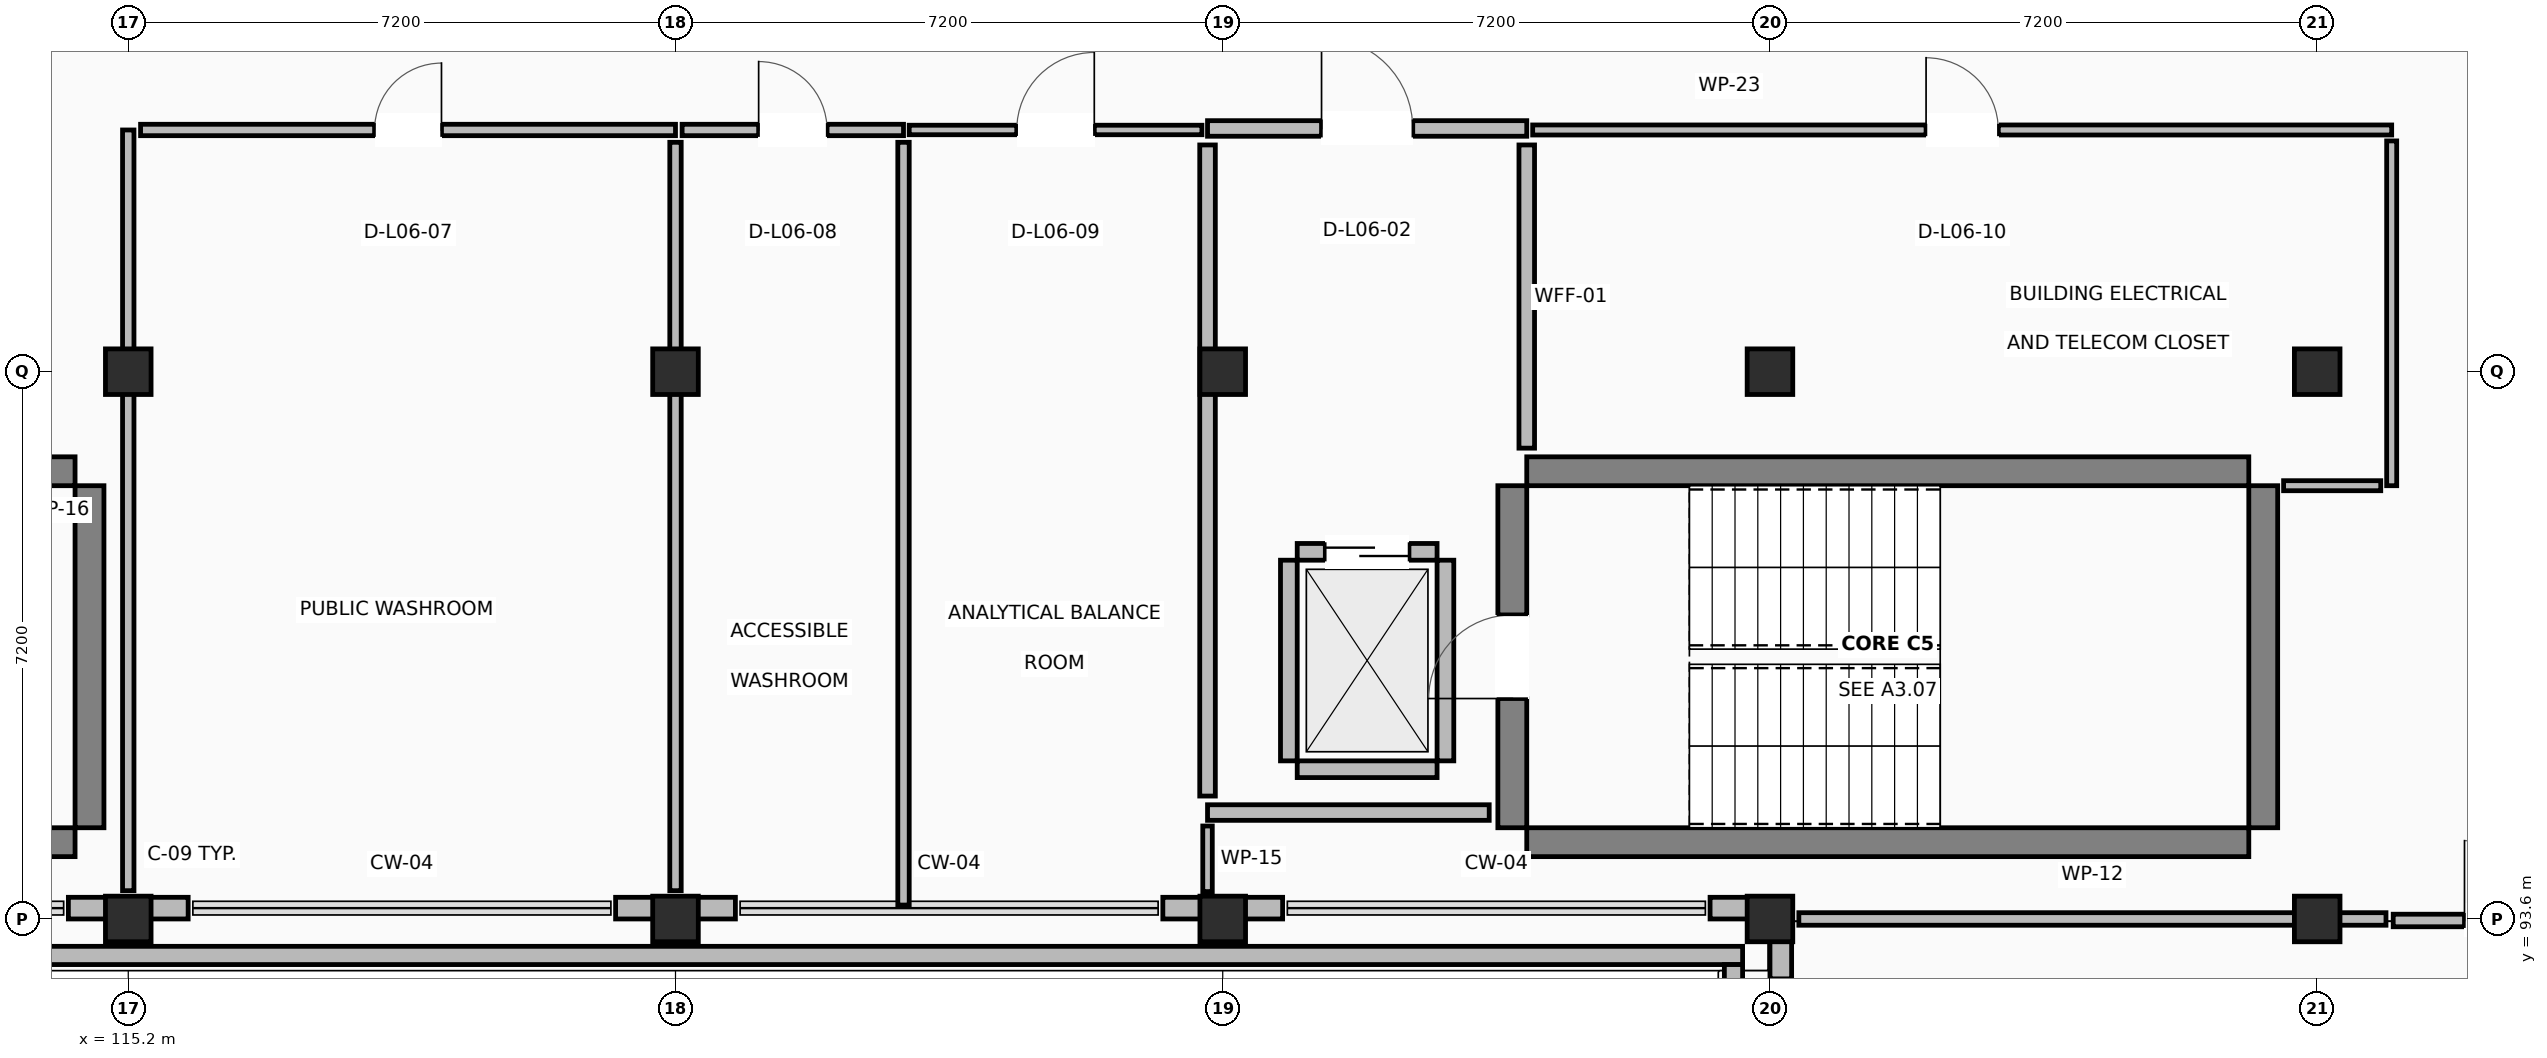
"""IFC4 building model, lengths in metres.
Left out: names, types, materials, properties, quantities, classifications, styles, units other than length and angle.
Written with IfcOpenShell. Run it as: python <this file> out.ifc"""

import sys

from ifc_helpers import new_model, si_unit, direction, frame, frame_2d, origin, origin_2d, place, context, subcontext, project, spatial, rectangle, extrude, element, fill, save


model = new_model("IFC4")
c1 = context("Model", 3, precision=1e-05, world=origin(), true_north=direction((0.0, 1.0)))
c2 = subcontext(c1, "Body", "Model", "MODEL_VIEW")
j1 = project(units=[si_unit("LENGTHUNIT", "METRE"), si_unit("PLANEANGLEUNIT", "RADIAN")], contexts=[c1])
p1 = place(None, origin())
s1 = spatial("IfcSite", under=j1, at=p1, CompositionType="ELEMENT")
p2 = place(p1, origin())
s2 = spatial("IfcBuilding", under=s1, at=p2, CompositionType="ELEMENT")
p3 = place(p2, frame((0.0, 0.0, 27.0)))
s3 = spatial("IfcBuildingStorey", under=s2, at=p3, CompositionType="ELEMENT", Elevation=27.0)
for number, where, z_axis, x_axis in (
    (1, (115.2, 93.6, 0.0), (0.0, 0.0, 1.0), (1.0, 0.0, 0.0)),
    (2, (115.2, 100.8, 0.0), (0.0, 0.0, 1.0), (1.0, 0.0, 0.0)),
    (3, (122.4, 93.6, 0.0), (0.0, 0.0, 1.0), (1.0, 0.0, 0.0)),
    (4, (122.4, 100.8, 0.0), (0.0, 0.0, 1.0), (1.0, 0.0, 0.0)),
    (5, (129.6, 93.6, 0.0), (0.0, 0.0, 1.0), (1.0, 0.0, 0.0)),
    (6, (129.6, 100.8, 0.0), (0.0, 0.0, 1.0), (1.0, 0.0, 0.0)),
    (7, (136.8, 93.6, 0.0), (0.0, 0.0, 1.0), (1.0, 0.0, 0.0)),
    (8, (136.8, 100.8, 0.0), (0.0, 0.0, 1.0), (1.0, 0.0, 0.0)),
    (9, (144.0, 93.6, 0.0), (0.0, 0.0, 1.0), (1.0, 0.0, 0.0)),
    (10, (144.0, 100.8, 0.0), (0.0, 0.0, 1.0), (1.0, 0.0, 0.0)),
):
    element("IfcColumn", number, at=place(p3, frame(where, z_axis=z_axis, x_axis=x_axis)), inside=s3, PredefinedType="COLUMN", context=c2, shape_type="SweptSolid", body=[
        extrude(rectangle(XDim=0.6, YDim=0.6, at=origin_2d()), origin(), (0.0, 0.0, 1.0), 3.92),
    ])
for number, where, z_axis, x_axis in (
    (11, (105.0, 94.61, 0.0), (0.0, 0.0, 1.0), (1.0, 0.0, 0.0)),
    (12, (105.0, 99.49, 0.0), (0.0, 0.0, 1.0), (1.0, 0.0, 0.0)),
):
    element("IfcWall", number, at=place(p3, frame(where, z_axis=z_axis, x_axis=x_axis)), inside=s3, PredefinedType="SHEAR", context=c2, shape_type="SweptSolid", body=[
        extrude(rectangle(XDim=9.5, YDim=0.38, at=frame_2d((4.75, 0.0))), origin(), (0.0, 0.0, 1.0), 3.92),
    ])
p4 = place(p3, frame((114.69, 94.8, 0.0), z_axis=(0.0, 0.0, 1.0), x_axis=(0.0, 1.0, 0.0)))
e13 = element("IfcWall", 13, at=p4, inside=s3, PredefinedType="SHEAR", context=c2, shape_type="SweptSolid", body=[
    extrude(rectangle(XDim=4.5, YDim=0.38, at=frame_2d((2.25, 0.0))), origin(), (0.0, 0.0, 1.0), 3.92),
])
for number, where, z_axis, x_axis in (
    (14, (133.6, 94.61, 0.0), (0.0, 0.0, 1.0), (1.0, 0.0, 0.0)),
    (15, (133.6, 99.49, 0.0), (0.0, 0.0, 1.0), (1.0, 0.0, 0.0)),
):
    element("IfcWall", number, at=place(p3, frame(where, z_axis=z_axis, x_axis=x_axis)), inside=s3, PredefinedType="SHEAR", context=c2, shape_type="SweptSolid", body=[
        extrude(rectangle(XDim=9.5, YDim=0.38, at=frame_2d((4.75, 0.0))), origin(), (0.0, 0.0, 1.0), 3.92),
    ])
p5 = place(p3, frame((133.41, 94.8, 0.0), z_axis=(0.0, 0.0, 1.0), x_axis=(0.0, 1.0, 0.0)))
e16 = element("IfcWall", 16, at=p5, inside=s3, PredefinedType="SHEAR", context=c2, shape_type="SweptSolid", body=[
    extrude(rectangle(XDim=4.5, YDim=0.38, at=frame_2d((2.25, 0.0))), origin(), (0.0, 0.0, 1.0), 3.92),
])
p6 = place(p5, frame((1.7, 0.0, 0.0)))
e17 = element("IfcOpeningElement", 17, at=p6, cuts=e16, PredefinedType="OPENING", context=c2, shape_type="SweptSolid", body=[
    extrude(rectangle(XDim=1.1, YDim=2.15, at=frame_2d((0.55, 1.075))), frame((0.0, 0.2, 0.0), z_axis=(0.0, -1.0, 0.0), x_axis=(1.0, 0.0, 0.0)), (0.0, 0.0, 1.0), 0.4),
])
p7 = place(p3, frame((143.29, 94.8, 0.0), z_axis=(0.0, 0.0, 1.0), x_axis=(0.0, 1.0, 0.0)))
e18 = element("IfcWall", 18, at=p7, inside=s3, PredefinedType="SHEAR", context=c2, shape_type="SweptSolid", body=[
    extrude(rectangle(XDim=4.5, YDim=0.38, at=frame_2d((2.25, 0.0))), origin(), (0.0, 0.0, 1.0), 3.92),
])
for number, where, z_axis, x_axis in (
    (19, (114.412, 93.742, 0.0), (0.0, 0.0, 1.0), (1.0, 0.0, 0.0)),
    (20, (121.612, 93.742, 0.0), (0.0, 0.0, 1.0), (1.0, 0.0, 0.0)),
    (21, (128.812, 93.742, 0.0), (0.0, 0.0, 1.0), (1.0, 0.0, 0.0)),
):
    element("IfcWall", number, at=place(p3, frame(where, z_axis=z_axis, x_axis=x_axis)), inside=s3, PredefinedType="STANDARD", context=c2, shape_type="SweptSolid", body=[
        extrude(rectangle(XDim=1.576, YDim=0.285, at=frame_2d((0.788, 0.0))), origin(), (0.0, 0.0, 1.0), 2.96),
    ])
p8 = place(p3, frame((136.012, 93.742, 0.0), z_axis=(0.0, 0.0, 1.0), x_axis=(1.0, 0.0, 0.0)))
e22 = element("IfcWall", 22, at=p8, inside=s3, PredefinedType="STANDARD", context=c2, shape_type="SweptSolid", body=[
    extrude(rectangle(XDim=0.788, YDim=0.285, at=frame_2d((0.394, 0.0))), origin(), (0.0, 0.0, 1.0), 2.96),
])
p9 = place(p3, frame((136.942, 93.885, 0.0), z_axis=(0.0, 0.0, 1.0), x_axis=(0.0, -1.0, 0.0)))
e23 = element("IfcWall", 23, at=p9, inside=s3, PredefinedType="STANDARD", context=c2, shape_type="SweptSolid", body=[
    extrude(rectangle(XDim=1.073, YDim=0.285, at=frame_2d((0.537, 0.0))), origin(), (0.0, 0.0, 1.0), 2.96),
])
p10 = place(p3, frame((136.44, 93.12, 0.0), z_axis=(0.0, 0.0, 1.0), x_axis=(-1.0, 0.0, 0.0)))
e24 = element("IfcWall", 24, at=p10, inside=s3, PredefinedType="PARAPET", context=c2, shape_type="SweptSolid", body=[
    extrude(rectangle(XDim=57.84, YDim=0.24, at=frame_2d((28.92, 0.0))), origin(), (0.0, 0.0, 1.0), 1.12),
])
p11 = place(p3, frame((136.32, 86.04, 0.0), z_axis=(0.0, 0.0, 1.0), x_axis=(0.0, 1.0, 0.0)))
e25 = element("IfcWall", 25, at=p11, inside=s3, PredefinedType="PARAPET", context=c2, shape_type="SweptSolid", body=[
    extrude(rectangle(XDim=6.96, YDim=0.24, at=frame_2d((3.48, 0.0))), origin(), (0.0, 0.0, 1.0), 1.12),
])
p12 = place(p3, frame((130.58, 95.57, 0.0), z_axis=(0.0, 0.0, 1.0), x_axis=(1.0, 0.0, 0.0)))
e26 = element("IfcWall", 26, at=p12, inside=s3, PredefinedType="STANDARD", context=c2, shape_type="SweptSolid", body=[
    extrude(rectangle(XDim=1.84, YDim=0.22, at=frame_2d((0.92, 0.0))), origin(), (0.0, 0.0, 1.0), 2.96),
])
p13 = place(p3, frame((130.58, 98.43, 0.0), z_axis=(0.0, 0.0, 1.0), x_axis=(1.0, 0.0, 0.0)))
e27 = element("IfcWall", 27, at=p13, inside=s3, PredefinedType="STANDARD", context=c2, shape_type="SweptSolid", body=[
    extrude(rectangle(XDim=1.84, YDim=0.22, at=frame_2d((0.92, 0.0))), origin(), (0.0, 0.0, 1.0), 2.96),
])
p14 = place(p13, frame((0.37, 0.0, 0.0)))
e28 = element("IfcOpeningElement", 28, at=p14, cuts=e27, PredefinedType="OPENING", context=c2, shape_type="SweptSolid", body=[
    extrude(rectangle(XDim=1.1, YDim=2.15, at=frame_2d((0.55, 1.075))), frame((0.0, 0.12, 0.0), z_axis=(0.0, -1.0, 0.0), x_axis=(1.0, 0.0, 0.0)), (0.0, 0.0, 1.0), 0.24),
])
for number, where, z_axis, x_axis in (
    (29, (130.47, 95.68, 0.0), (0.0, 0.0, 1.0), (0.0, 1.0, 0.0)),
    (30, (132.53, 95.68, 0.0), (0.0, 0.0, 1.0), (0.0, 1.0, 0.0)),
):
    element("IfcWall", number, at=place(p3, frame(where, z_axis=z_axis, x_axis=x_axis)), inside=s3, PredefinedType="STANDARD", context=c2, shape_type="SweptSolid", body=[
        extrude(rectangle(XDim=2.64, YDim=0.22, at=frame_2d((1.32, 0.0))), origin(), (0.0, 0.0, 1.0), 2.96),
    ])
p15 = place(p3, frame((129.4, 104.0, 0.0), z_axis=(0.0, 0.0, 1.0), x_axis=(1.0, 0.0, 0.0)))
e31 = element("IfcWall", 31, at=p15, inside=s3, PredefinedType="PARTITIONING", context=c2, shape_type="SweptSolid", body=[
    extrude(rectangle(XDim=4.2, YDim=0.205, at=frame_2d((2.1, 0.0))), origin(), (0.0, 0.0, 1.0), 2.96),
])
p16 = place(p15, frame((1.5, 0.0, 0.0)))
e32 = element("IfcOpeningElement", 32, at=p16, cuts=e31, PredefinedType="OPENING", context=c2, shape_type="SweptSolid", body=[
    extrude(rectangle(XDim=1.2, YDim=2.15, at=frame_2d((0.6, 1.075))), frame((0.0, 0.113, 0.0), z_axis=(0.0, -1.0, 0.0), x_axis=(1.0, 0.0, 0.0)), (0.0, 0.0, 1.0), 0.225),
])
p17 = place(p3, frame((133.6, 103.783, 0.0), z_axis=(0.0, 0.0, 1.0), x_axis=(0.0, -1.0, 0.0)))
e33 = element("IfcWall", 33, at=p17, inside=s3, PredefinedType="PARTITIONING", context=c2, shape_type="SweptSolid", body=[
    extrude(rectangle(XDim=3.989, YDim=0.205, at=frame_2d((1.995, 0.0))), origin(), (0.0, 0.0, 1.0), 2.96),
])
p18 = place(p3, frame((133.106, 95.0, 0.0), z_axis=(0.0, 0.0, 1.0), x_axis=(-1.0, 0.0, 0.0)))
e34 = element("IfcWall", 34, at=p18, inside=s3, PredefinedType="PARTITIONING", context=c2, shape_type="SweptSolid", body=[
    extrude(rectangle(XDim=3.706, YDim=0.205, at=frame_2d((1.853, 0.0))), origin(), (0.0, 0.0, 1.0), 2.96),
])
p19 = place(p3, frame((129.4, 95.217, 0.0), z_axis=(0.0, 0.0, 1.0), x_axis=(0.0, 1.0, 0.0)))
e35 = element("IfcWall", 35, at=p19, inside=s3, PredefinedType="PARTITIONING", context=c2, shape_type="SweptSolid", body=[
    extrude(rectangle(XDim=8.566, YDim=0.205, at=frame_2d((4.283, 0.0))), origin(), (0.0, 0.0, 1.0), 2.96),
])
p20 = place(p3, frame((115.2, 93.972, 0.0), z_axis=(0.0, 0.0, 1.0), x_axis=(0.0, 1.0, 0.0)))
e36 = element("IfcWall", 36, at=p20, inside=s3, PredefinedType="PARTITIONING", context=c2, shape_type="SweptSolid", body=[
    extrude(rectangle(XDim=10.008, YDim=0.15, at=frame_2d((5.004, 0.0))), origin(), (0.0, 0.0, 1.0), 2.96),
])
p21 = place(p3, frame((115.362, 103.98, 0.0), z_axis=(0.0, 0.0, 1.0), x_axis=(1.0, 0.0, 0.0)))
e37 = element("IfcWall", 37, at=p21, inside=s3, PredefinedType="PARTITIONING", context=c2, shape_type="SweptSolid", body=[
    extrude(rectangle(XDim=7.038, YDim=0.15, at=frame_2d((3.519, 0.0))), origin(), (0.0, 0.0, 1.0), 2.96),
])
p22 = place(p21, frame((3.079, 0.0, 0.0)))
e38 = element("IfcOpeningElement", 38, at=p22, cuts=e37, PredefinedType="OPENING", context=c2, shape_type="SweptSolid", body=[
    extrude(rectangle(XDim=0.88, YDim=2.1, at=frame_2d((0.44, 1.05))), frame((0.0, 0.085, 0.0), z_axis=(0.0, -1.0, 0.0), x_axis=(1.0, 0.0, 0.0)), (0.0, 0.0, 1.0), 0.17),
])
p23 = place(p3, frame((122.4, 103.818, 0.0), z_axis=(0.0, 0.0, 1.0), x_axis=(0.0, -1.0, 0.0)))
e39 = element("IfcWall", 39, at=p23, inside=s3, PredefinedType="PARTITIONING", context=c2, shape_type="SweptSolid", body=[
    extrude(rectangle(XDim=9.846, YDim=0.15, at=frame_2d((4.923, 0.0))), origin(), (0.0, 0.0, 1.0), 2.96),
])
p24 = place(p3, frame((122.487, 103.98, 0.0), z_axis=(0.0, 0.0, 1.0), x_axis=(1.0, 0.0, 0.0)))
e40 = element("IfcWall", 40, at=p24, inside=s3, PredefinedType="PARTITIONING", context=c2, shape_type="SweptSolid", body=[
    extrude(rectangle(XDim=2.913, YDim=0.15, at=frame_2d((1.457, 0.0))), origin(), (0.0, 0.0, 1.0), 2.96),
])
p25 = place(p24, frame((1.007, 0.0, 0.0)))
e41 = element("IfcOpeningElement", 41, at=p25, cuts=e40, PredefinedType="OPENING", context=c2, shape_type="SweptSolid", body=[
    extrude(rectangle(XDim=0.9, YDim=2.1, at=frame_2d((0.45, 1.05))), frame((0.0, 0.085, 0.0), z_axis=(0.0, -1.0, 0.0), x_axis=(1.0, 0.0, 0.0)), (0.0, 0.0, 1.0), 0.17),
])
p26 = place(p3, frame((125.4, 103.818, 0.0), z_axis=(0.0, 0.0, 1.0), x_axis=(0.0, -1.0, 0.0)))
e42 = element("IfcWall", 42, at=p26, inside=s3, PredefinedType="PARTITIONING", context=c2, shape_type="SweptSolid", body=[
    extrude(rectangle(XDim=10.035, YDim=0.15, at=frame_2d((5.018, 0.0))), origin(), (0.0, 0.0, 1.0), 2.96),
])
p27 = place(p3, frame((125.475, 103.98, 0.0), z_axis=(0.0, 0.0, 1.0), x_axis=(1.0, 0.0, 0.0)))
e43 = element("IfcWall", 43, at=p27, inside=s3, PredefinedType="PARTITIONING", context=c2, shape_type="SweptSolid", body=[
    extrude(rectangle(XDim=3.851, YDim=0.125, at=frame_2d((1.925, 0.0))), origin(), (0.0, 0.0, 1.0), 2.96),
])
p28 = place(p27, frame((1.415, 0.0, 0.0)))
e44 = element("IfcOpeningElement", 44, at=p28, cuts=e43, PredefinedType="OPENING", context=c2, shape_type="SweptSolid", body=[
    extrude(rectangle(XDim=1.02, YDim=2.15, at=frame_2d((0.51, 1.075))), frame((0.0, 0.073, 0.0), z_axis=(0.0, -1.0, 0.0), x_axis=(1.0, 0.0, 0.0)), (0.0, 0.0, 1.0), 0.145),
])
p29 = place(p3, frame((129.4, 94.823, 0.0), z_axis=(0.0, 0.0, 1.0), x_axis=(0.0, -1.0, 0.0)))
e45 = element("IfcWall", 45, at=p29, inside=s3, PredefinedType="PARTITIONING", context=c2, shape_type="SweptSolid", body=[
    extrude(rectangle(XDim=0.863, YDim=0.125, at=frame_2d((0.432, 0.0))), origin(), (0.0, 0.0, 1.0), 2.96),
])
p30 = place(p3, frame((133.678, 103.98, 0.0), z_axis=(0.0, 0.0, 1.0), x_axis=(1.0, 0.0, 0.0)))
e46 = element("IfcWall", 46, at=p30, inside=s3, PredefinedType="PARTITIONING", context=c2, shape_type="SweptSolid", body=[
    extrude(rectangle(XDim=11.302, YDim=0.132, at=frame_2d((5.651, 0.0))), origin(), (0.0, 0.0, 1.0), 2.96),
])
p31 = place(p30, frame((5.176, 0.0, 0.0)))
e47 = element("IfcOpeningElement", 47, at=p31, cuts=e46, PredefinedType="OPENING", context=c2, shape_type="SweptSolid", body=[
    extrude(rectangle(XDim=0.95, YDim=2.1, at=frame_2d((0.475, 1.05))), frame((0.0, 0.076, 0.0), z_axis=(0.0, -1.0, 0.0), x_axis=(1.0, 0.0, 0.0)), (0.0, 0.0, 1.0), 0.152),
])
p32 = place(p3, frame((144.98, 103.836, 0.0), z_axis=(0.0, 0.0, 1.0), x_axis=(0.0, -1.0, 0.0)))
e48 = element("IfcWall", 48, at=p32, inside=s3, PredefinedType="PARTITIONING", context=c2, shape_type="SweptSolid", body=[
    extrude(rectangle(XDim=4.536, YDim=0.132, at=frame_2d((2.268, 0.0))), origin(), (0.0, 0.0, 1.0), 2.96),
])
p33 = place(p3, frame((144.836, 99.3, 0.0), z_axis=(0.0, 0.0, 1.0), x_axis=(-1.0, 0.0, 0.0)))
e49 = element("IfcWall", 49, at=p33, inside=s3, PredefinedType="PARTITIONING", context=c2, shape_type="SweptSolid", body=[
    extrude(rectangle(XDim=1.278, YDim=0.132, at=frame_2d((0.639, 0.0))), origin(), (0.0, 0.0, 1.0), 2.96),
])
p34 = place(p3, frame((145.0, 93.58, 0.0), z_axis=(0.0, 0.0, 1.0), x_axis=(1.0, 0.0, 0.0)))
e50 = element("IfcWall", 50, at=p34, inside=s3, PredefinedType="PARTITIONING", context=c2, shape_type="SweptSolid", body=[
    extrude(rectangle(XDim=2.925, YDim=0.165, at=frame_2d((1.462, 0.0))), origin(), (0.0, 0.0, 1.0), 2.96),
])
p35 = place(p34, frame((0.938, 0.0, 0.0)))
e51 = element("IfcOpeningElement", 51, at=p35, cuts=e50, PredefinedType="OPENING", context=c2, shape_type="SweptSolid", body=[
    extrude(rectangle(XDim=1.05, YDim=2.15, at=frame_2d((0.525, 1.075))), frame((0.0, 0.093, 0.0), z_axis=(0.0, -1.0, 0.0), x_axis=(1.0, 0.0, 0.0)), (0.0, 0.0, 1.0), 0.185),
])
p36 = place(p3, frame((137.18, 93.6, 0.0), z_axis=(0.0, 0.0, 1.0), x_axis=(1.0, 0.0, 0.0)))
e52 = element("IfcWall", 52, at=p36, inside=s3, PredefinedType="PARTITIONING", context=c2, shape_type="SweptSolid", body=[
    extrude(rectangle(XDim=7.725, YDim=0.165, at=frame_2d((3.863, 0.0))), origin(), (0.0, 0.0, 1.0), 2.96),
])
p37 = place(p6, origin())
e53 = element("IfcDoor", 53, at=p37, inside=s3, OperationType="SINGLE_SWING_LEFT", PredefinedType="DOOR", context=c2, shape_type="SweptSolid", body=[
    extrude(rectangle(XDim=1.1, YDim=2.15, at=frame_2d((0.55, 1.075))), frame((0.0, 0.025, 0.0), z_axis=(0.0, -1.0, 0.0), x_axis=(1.0, 0.0, 0.0)), (0.0, 0.0, 1.0), 0.05),
])
fill(e17, e53)
p38 = place(p14, origin())
e54 = element("IfcDoor", 54, at=p38, inside=s3, OperationType="SLIDING_TO_LEFT", PredefinedType="DOOR", context=c2, shape_type="SweptSolid", body=[
    extrude(rectangle(XDim=1.1, YDim=2.15, at=frame_2d((0.55, 1.075))), frame((0.0, 0.025, 0.0), z_axis=(0.0, -1.0, 0.0), x_axis=(1.0, 0.0, 0.0)), (0.0, 0.0, 1.0), 0.05),
])
fill(e28, e54)
p39 = place(p16, origin())
e55 = element("IfcDoor", 55, at=p39, inside=s3, OperationType="SINGLE_SWING_LEFT", PredefinedType="DOOR", context=c2, shape_type="SweptSolid", body=[
    extrude(rectangle(XDim=1.2, YDim=2.15, at=frame_2d((0.6, 1.075))), frame((0.0, 0.025, 0.0), z_axis=(0.0, -1.0, 0.0), x_axis=(1.0, 0.0, 0.0)), (0.0, 0.0, 1.0), 0.05),
])
fill(e32, e55)
p40 = place(p22, origin())
e56 = element("IfcDoor", 56, at=p40, inside=s3, OperationType="SINGLE_SWING_RIGHT", PredefinedType="DOOR", context=c2, shape_type="SweptSolid", body=[
    extrude(rectangle(XDim=0.88, YDim=2.1, at=frame_2d((0.44, 1.05))), frame((0.0, 0.025, 0.0), z_axis=(0.0, -1.0, 0.0), x_axis=(1.0, 0.0, 0.0)), (0.0, 0.0, 1.0), 0.05),
])
fill(e38, e56)
p41 = place(p25, origin())
e57 = element("IfcDoor", 57, at=p41, inside=s3, OperationType="SINGLE_SWING_LEFT", PredefinedType="DOOR", context=c2, shape_type="SweptSolid", body=[
    extrude(rectangle(XDim=0.9, YDim=2.1, at=frame_2d((0.45, 1.05))), frame((0.0, 0.025, 0.0), z_axis=(0.0, -1.0, 0.0), x_axis=(1.0, 0.0, 0.0)), (0.0, 0.0, 1.0), 0.05),
])
fill(e41, e57)
p42 = place(p28, origin())
e58 = element("IfcDoor", 58, at=p42, inside=s3, OperationType="SINGLE_SWING_RIGHT", PredefinedType="DOOR", context=c2, shape_type="SweptSolid", body=[
    extrude(rectangle(XDim=1.02, YDim=2.15, at=frame_2d((0.51, 1.075))), frame((0.0, 0.025, 0.0), z_axis=(0.0, -1.0, 0.0), x_axis=(1.0, 0.0, 0.0)), (0.0, 0.0, 1.0), 0.05),
])
fill(e44, e58)
p43 = place(p31, origin())
e59 = element("IfcDoor", 59, at=p43, inside=s3, OperationType="SINGLE_SWING_LEFT", PredefinedType="DOOR", context=c2, shape_type="SweptSolid", body=[
    extrude(rectangle(XDim=0.95, YDim=2.1, at=frame_2d((0.475, 1.05))), frame((0.0, 0.025, 0.0), z_axis=(0.0, -1.0, 0.0), x_axis=(1.0, 0.0, 0.0)), (0.0, 0.0, 1.0), 0.05),
])
fill(e47, e59)
p44 = place(p35, origin())
e60 = element("IfcDoor", 60, at=p44, inside=s3, OperationType="SINGLE_SWING_LEFT", PredefinedType="DOOR", context=c2, shape_type="SweptSolid", body=[
    extrude(rectangle(XDim=1.05, YDim=2.15, at=frame_2d((0.525, 1.075))), frame((0.0, 0.025, 0.0), z_axis=(0.0, -1.0, 0.0), x_axis=(1.0, 0.0, 0.0)), (0.0, 0.0, 1.0), 0.05),
])
fill(e51, e60)
save(model, sys.argv[1])
